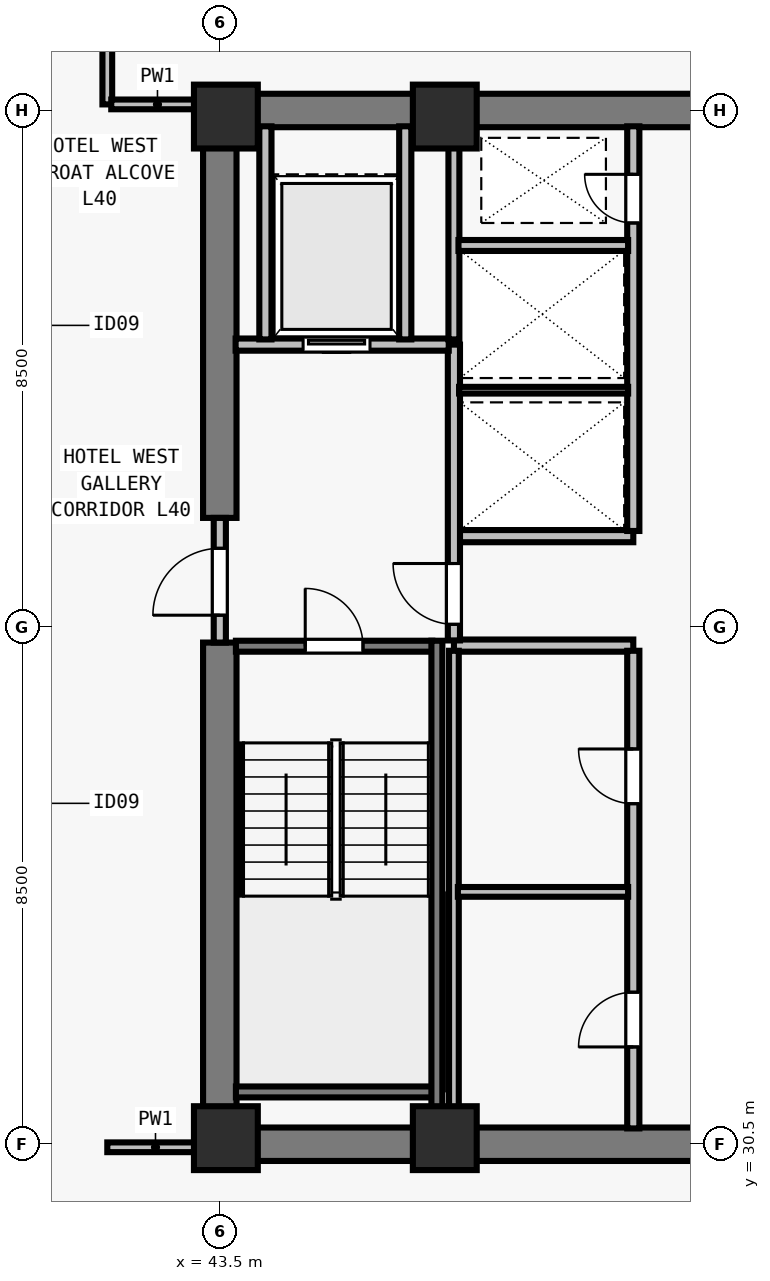
"""IFC4 building model, lengths in metres.
Left out: names, types, materials, properties, quantities, classifications, styles, units other than length and angle.
Written with IfcOpenShell. Run it as: python <this file> out.ifc"""

import sys

from ifc_helpers import new_model, si_unit, direction, frame, frame_2d, origin, origin_2d, place, context, subcontext, project, spatial, rectangle, extrude, element, fill, save


model = new_model("IFC4")
c1 = context("Model", 3, precision=1e-05, world=origin(), true_north=direction((0.0, 1.0)))
c2 = subcontext(c1, "Body", "Model", "MODEL_VIEW")
j1 = project(units=[si_unit("LENGTHUNIT", "METRE"), si_unit("PLANEANGLEUNIT", "RADIAN")], contexts=[c1])
p1 = place(None, origin())
s1 = spatial("IfcSite", under=j1, at=p1, CompositionType="ELEMENT")
p2 = place(p1, origin())
s2 = spatial("IfcBuilding", under=s1, at=p2, CompositionType="ELEMENT")
p3 = place(p2, frame((0.0, 0.0, 148.0)))
s3 = spatial("IfcBuildingStorey", under=s2, at=p3, CompositionType="ELEMENT", Elevation=148.0)
for number, where, z_axis, x_axis in (
    (1, (43.6, 30.6, 0.0), (0.0, 0.0, 1.0), (1.0, 0.0, 0.0)),
    (2, (47.2, 30.6, 0.0), (0.0, 0.0, 1.0), (1.0, 0.0, 0.0)),
    (3, (43.6, 47.4, 0.0), (0.0, 0.0, 1.0), (1.0, 0.0, 0.0)),
    (4, (47.2, 47.4, 0.0), (0.0, 0.0, 1.0), (1.0, 0.0, 0.0)),
):
    element("IfcColumn", number, at=place(p3, frame(where, z_axis=z_axis, x_axis=x_axis)), inside=s3, PredefinedType="COLUMN", context=c2, shape_type="SweptSolid", body=[
        extrude(rectangle(XDim=1.05, YDim=1.05, at=origin_2d()), origin(), (0.0, 0.0, 1.0), 3.5),
    ])
for number, where, z_axis, x_axis in (
    (5, (43.225, 30.5, 0.0), (0.0, 0.0, 1.0), (1.0, 0.0, 0.0)),
    (6, (43.225, 47.5, 0.0), (0.0, 0.0, 1.0), (1.0, 0.0, 0.0)),
):
    element("IfcWall", number, at=place(p3, frame(where, z_axis=z_axis, x_axis=x_axis)), inside=s3, PredefinedType="SHEAR", context=c2, shape_type="SweptSolid", body=[
        extrude(rectangle(XDim=17.55, YDim=0.55, at=frame_2d((8.775, 0.0))), origin(), (0.0, 0.0, 1.0), 3.28),
    ])
p4 = place(p3, frame((43.5, 30.765, 0.0), z_axis=(0.0, 0.0, 1.0), x_axis=(0.0, 1.0, 0.0)))
e7 = element("IfcWall", 7, at=p4, inside=s3, PredefinedType="SHEAR", context=c2, shape_type="SweptSolid", body=[
    extrude(rectangle(XDim=7.985, YDim=0.55, at=frame_2d((3.993, 0.0))), origin(), (0.0, 0.0, 1.0), 3.28),
])
p5 = place(p3, frame((43.5, 40.8, 0.0), z_axis=(0.0, 0.0, 1.0), x_axis=(0.0, 1.0, 0.0)))
e8 = element("IfcWall", 8, at=p5, inside=s3, PredefinedType="SHEAR", context=c2, shape_type="SweptSolid", body=[
    extrude(rectangle(XDim=6.435, YDim=0.55, at=frame_2d((3.218, 0.0))), origin(), (0.0, 0.0, 1.0), 3.28),
])
for number, where, z_axis, x_axis in (
    (9, (47.35, 38.7, 0.0), (0.0, 0.0, 1.0), (1.0, 0.0, 0.0)),
    (10, (47.35, 40.5, 0.0), (0.0, 0.0, 1.0), (1.0, 0.0, 0.0)),
):
    element("IfcWall", number, at=place(p3, frame(where, z_axis=z_axis, x_axis=x_axis)), inside=s3, PredefinedType="SOLIDWALL", context=c2, shape_type="SweptSolid", body=[
        extrude(rectangle(XDim=2.95, YDim=0.2, at=frame_2d((1.475, 0.0))), origin(), (0.0, 0.0, 1.0), 3.28),
    ])
p6 = place(p3, frame((50.3, 30.76, 0.0), z_axis=(0.0, 0.0, 1.0), x_axis=(0.0, 1.0, 0.0)))
e11 = element("IfcWall", 11, at=p6, inside=s3, PredefinedType="SOLIDWALL", context=c2, shape_type="SweptSolid", body=[
    extrude(rectangle(XDim=7.855, YDim=0.2, at=frame_2d((3.927, 0.0))), origin(), (0.0, 0.0, 1.0), 3.28),
])
p7 = place(p6, frame((1.34, 0.0, 0.0)))
e12 = element("IfcOpeningElement", 12, at=p7, cuts=e11, PredefinedType="OPENING", context=c2, shape_type="SweptSolid", body=[
    extrude(rectangle(XDim=0.9, YDim=2.12, at=frame_2d((0.45, 1.06))), frame((0.0, 0.11, 0.0), z_axis=(0.0, -1.0, 0.0), x_axis=(1.0, 0.0, 0.0)), (0.0, 0.0, 1.0), 0.22),
])
p8 = place(p6, frame((5.34, 0.0, 0.0)))
e13 = element("IfcOpeningElement", 13, at=p8, cuts=e11, PredefinedType="OPENING", context=c2, shape_type="SweptSolid", body=[
    extrude(rectangle(XDim=0.9, YDim=2.12, at=frame_2d((0.45, 1.06))), frame((0.0, 0.11, 0.0), z_axis=(0.0, -1.0, 0.0), x_axis=(1.0, 0.0, 0.0)), (0.0, 0.0, 1.0), 0.22),
])
p9 = place(p3, frame((50.3, 40.585, 0.0), z_axis=(0.0, 0.0, 1.0), x_axis=(0.0, 1.0, 0.0)))
e14 = element("IfcWall", 14, at=p9, inside=s3, PredefinedType="SOLIDWALL", context=c2, shape_type="SweptSolid", body=[
    extrude(rectangle(XDim=6.655, YDim=0.2, at=frame_2d((3.328, 0.0))), origin(), (0.0, 0.0, 1.0), 3.28),
])
p10 = place(p9, frame((5.065, 0.0, 0.0)))
e15 = element("IfcOpeningElement", 15, at=p10, cuts=e14, PredefinedType="OPENING", context=c2, shape_type="SweptSolid", body=[
    extrude(rectangle(XDim=0.8, YDim=2.08, at=frame_2d((0.4, 1.04))), frame((0.0, 0.11, 0.0), z_axis=(0.0, -1.0, 0.0), x_axis=(1.0, 0.0, 0.0)), (0.0, 0.0, 1.0), 0.22),
])
p11 = place(p3, frame((43.5, 38.75, 0.0), z_axis=(0.0, 0.0, 1.0), x_axis=(0.0, 1.0, 0.0)))
e16 = element("IfcWall", 16, at=p11, inside=s3, PredefinedType="SOLIDWALL", context=c2, shape_type="SweptSolid", body=[
    extrude(rectangle(XDim=2.05, YDim=0.2, at=frame_2d((1.025, 0.0))), origin(), (0.0, 0.0, 1.0), 3.28),
])
p12 = place(p11, frame((0.45, 0.0, 0.0)))
e17 = element("IfcOpeningElement", 17, at=p12, cuts=e16, PredefinedType="OPENING", context=c2, shape_type="SweptSolid", body=[
    extrude(rectangle(XDim=1.1, YDim=2.15, at=frame_2d((0.55, 1.075))), frame((0.0, 0.11, 0.0), z_axis=(0.0, -1.0, 0.0), x_axis=(1.0, 0.0, 0.0)), (0.0, 0.0, 1.0), 0.22),
])
p13 = place(p3, frame((47.35, 38.785, 0.0), z_axis=(0.0, 0.0, 1.0), x_axis=(0.0, 1.0, 0.0)))
e18 = element("IfcWall", 18, at=p13, inside=s3, PredefinedType="SOLIDWALL", context=c2, shape_type="SweptSolid", body=[
    extrude(rectangle(XDim=4.865, YDim=0.2, at=frame_2d((2.433, 0.0))), origin(), (0.0, 0.0, 1.0), 3.28),
])
p14 = place(p13, frame((0.265, 0.0, 0.0)))
e19 = element("IfcOpeningElement", 19, at=p14, cuts=e18, PredefinedType="OPENING", context=c2, shape_type="SweptSolid", body=[
    extrude(rectangle(XDim=1.0, YDim=2.15, at=frame_2d((0.5, 1.075))), frame((0.0, 0.11, 0.0), z_axis=(0.0, -1.0, 0.0), x_axis=(1.0, 0.0, 0.0)), (0.0, 0.0, 1.0), 0.22),
])
p15 = place(p3, frame((43.76, 43.65, 0.0), z_axis=(0.0, 0.0, 1.0), x_axis=(1.0, 0.0, 0.0)))
e20 = element("IfcWall", 20, at=p15, inside=s3, PredefinedType="SOLIDWALL", context=c2, shape_type="SweptSolid", body=[
    extrude(rectangle(XDim=3.505, YDim=0.2, at=frame_2d((1.752, 0.0))), origin(), (0.0, 0.0, 1.0), 3.28),
])
p16 = place(p15, frame((1.11, 0.0, 0.0)))
e21 = element("IfcOpeningElement", 21, at=p16, cuts=e20, PredefinedType="OPENING", context=c2, shape_type="SweptSolid", body=[
    extrude(rectangle(XDim=1.1, YDim=2.2, at=frame_2d((0.55, 1.1))), frame((0.0, 0.11, 0.0), z_axis=(0.0, -1.0, 0.0), x_axis=(1.0, 0.0, 0.0)), (0.0, 0.0, 1.0), 0.22),
])
for number, where, z_axis, x_axis in (
    (22, (46.55, 43.735, 0.0), (0.0, 0.0, 1.0), (0.0, 1.0, 0.0)),
    (23, (44.25, 43.735, 0.0), (0.0, 0.0, 1.0), (0.0, 1.0, 0.0)),
):
    element("IfcWall", number, at=place(p3, frame(where, z_axis=z_axis, x_axis=x_axis)), inside=s3, PredefinedType="SOLIDWALL", context=c2, shape_type="SweptSolid", body=[
        extrude(rectangle(XDim=3.505, YDim=0.2, at=frame_2d((1.752, 0.0))), origin(), (0.0, 0.0, 1.0), 3.28),
    ])
p17 = place(p3, frame((47.35, 30.76, 0.0), z_axis=(0.0, 0.0, 1.0), x_axis=(0.0, 1.0, 0.0)))
e24 = element("IfcWall", 24, at=p17, inside=s3, PredefinedType="PARTITIONING", context=c2, shape_type="SweptSolid", body=[
    extrude(rectangle(XDim=7.855, YDim=0.16, at=frame_2d((3.927, 0.0))), origin(), (0.0, 0.0, 1.0), 3.28),
])
p18 = place(p3, frame((47.415, 34.65, 0.0), z_axis=(0.0, 0.0, 1.0), x_axis=(1.0, 0.0, 0.0)))
e25 = element("IfcWall", 25, at=p18, inside=s3, PredefinedType="PARTITIONING", context=c2, shape_type="SweptSolid", body=[
    extrude(rectangle(XDim=2.8, YDim=0.16, at=frame_2d((1.4, 0.0))), origin(), (0.0, 0.0, 1.0), 3.28),
])
p19 = place(p3, frame((47.35, 43.735, 0.0), z_axis=(0.0, 0.0, 1.0), x_axis=(0.0, 1.0, 0.0)))
e26 = element("IfcWall", 26, at=p19, inside=s3, PredefinedType="SOLIDWALL", context=c2, shape_type="SweptSolid", body=[
    extrude(rectangle(XDim=3.505, YDim=0.18, at=frame_2d((1.752, 0.0))), origin(), (0.0, 0.0, 1.0), 3.28),
])
p20 = place(p3, frame((47.435, 42.9, 0.0), z_axis=(0.0, 0.0, 1.0), x_axis=(1.0, 0.0, 0.0)))
e27 = element("IfcWall", 27, at=p20, inside=s3, PredefinedType="PARTITIONING", context=c2, shape_type="SweptSolid", body=[
    extrude(rectangle(XDim=2.78, YDim=0.11, at=frame_2d((1.39, 0.0))), origin(), (0.0, 0.0, 1.0), 3.28),
])
p21 = place(p3, frame((47.425, 45.28, 0.0), z_axis=(0.0, 0.0, 1.0), x_axis=(1.0, 0.0, 0.0)))
e28 = element("IfcWall", 28, at=p21, inside=s3, PredefinedType="SOLIDWALL", context=c2, shape_type="SweptSolid", body=[
    extrude(rectangle(XDim=2.79, YDim=0.18, at=frame_2d((1.395, 0.0))), origin(), (0.0, 0.0, 1.0), 3.28),
])
p22 = place(p3, frame((41.65, 47.6, 0.0), z_axis=(0.0, 0.0, 1.0), x_axis=(0.0, 1.0, 0.0)))
e29 = element("IfcWall", 29, at=p22, inside=s3, PredefinedType="PARTITIONING", context=c2, shape_type="SweptSolid", body=[
    extrude(rectangle(XDim=15.075, YDim=0.16, at=frame_2d((7.538, 0.0))), origin(), (0.0, 0.0, 1.0), 2.555),
])
p23 = place(p22, frame((1.8, 0.0, 0.0)))
e30 = element("IfcOpeningElement", 30, at=p23, cuts=e29, PredefinedType="OPENING", context=c2, shape_type="SweptSolid", body=[
    extrude(rectangle(XDim=0.96, YDim=2.12, at=frame_2d((0.48, 1.06))), frame((0.0, 0.09, 0.0), z_axis=(0.0, -1.0, 0.0), x_axis=(1.0, 0.0, 0.0)), (0.0, 0.0, 1.0), 0.18),
])
p24 = place(p3, frame((41.65, 30.45, 0.0), z_axis=(0.0, 0.0, 1.0), x_axis=(1.0, 0.0, 0.0)))
e31 = element("IfcWall", 31, at=p24, inside=s3, PredefinedType="PARTITIONING", context=c2, shape_type="SweptSolid", body=[
    extrude(rectangle(XDim=1.585, YDim=0.16, at=frame_2d((0.792, 0.0))), origin(), (0.0, 0.0, 1.0), 3.28),
])
p25 = place(p3, frame((41.715, 47.6, 0.0), z_axis=(0.0, 0.0, 1.0), x_axis=(1.0, 0.0, 0.0)))
e32 = element("IfcWall", 32, at=p25, inside=s3, PredefinedType="PARTITIONING", context=c2, shape_type="SweptSolid", body=[
    extrude(rectangle(XDim=1.52, YDim=0.16, at=frame_2d((0.76, 0.0))), origin(), (0.0, 0.0, 1.0), 3.28),
])
p26 = place(p3, frame((43.765, 38.69, 0.0), z_axis=(0.0, 0.0, 1.0), x_axis=(1.0, 0.0, 0.0)))
e33 = element("IfcWall", 33, at=p26, inside=s3, PredefinedType="SOLIDWALL", context=c2, shape_type="SweptSolid", body=[
    extrude(rectangle(XDim=3.23, YDim=0.18, at=frame_2d((1.615, 0.0))), origin(), (0.0, 0.0, 1.0), 3.28),
])
p27 = place(p26, frame((1.14, 0.0, 0.0)))
e34 = element("IfcOpeningElement", 34, at=p27, cuts=e33, PredefinedType="OPENING", context=c2, shape_type="SweptSolid", body=[
    extrude(rectangle(XDim=0.95, YDim=2.15, at=frame_2d((0.475, 1.075))), frame((0.0, 0.1, 0.0), z_axis=(0.0, -1.0, 0.0), x_axis=(1.0, 0.0, 0.0)), (0.0, 0.0, 1.0), 0.2),
])
p28 = place(p3, frame((43.765, 31.36, 0.0), z_axis=(0.0, 0.0, 1.0), x_axis=(1.0, 0.0, 0.0)))
e35 = element("IfcWall", 35, at=p28, inside=s3, PredefinedType="SOLIDWALL", context=c2, shape_type="SweptSolid", body=[
    extrude(rectangle(XDim=3.23, YDim=0.18, at=frame_2d((1.615, 0.0))), origin(), (0.0, 0.0, 1.0), 3.28),
])
p29 = place(p3, frame((47.07, 38.78, 0.0), z_axis=(0.0, 0.0, 1.0), x_axis=(0.0, -1.0, 0.0)))
e36 = element("IfcWall", 36, at=p29, inside=s3, PredefinedType="SOLIDWALL", context=c2, shape_type="SweptSolid", body=[
    extrude(rectangle(XDim=8.017, YDim=0.18, at=frame_2d((4.009, 0.0))), origin(), (0.0, 0.0, 1.0), 3.28),
])
p30 = place(p12, origin())
e37 = element("IfcDoor", 37, at=p30, inside=s3, OperationType="SINGLE_SWING_LEFT", PredefinedType="DOOR", context=c2, shape_type="SweptSolid", body=[
    extrude(rectangle(XDim=1.1, YDim=2.15, at=frame_2d((0.55, 1.075))), frame((0.0, 0.025, 0.0), z_axis=(0.0, -1.0, 0.0), x_axis=(1.0, 0.0, 0.0)), (0.0, 0.0, 1.0), 0.05),
])
fill(e17, e37)
p31 = place(p14, origin())
e38 = element("IfcDoor", 38, at=p31, inside=s3, OperationType="SINGLE_SWING_RIGHT", PredefinedType="DOOR", context=c2, shape_type="SweptSolid", body=[
    extrude(rectangle(XDim=1.0, YDim=2.15, at=frame_2d((0.5, 1.075))), frame((0.0, 0.025, 0.0), z_axis=(0.0, -1.0, 0.0), x_axis=(1.0, 0.0, 0.0)), (0.0, 0.0, 1.0), 0.05),
])
fill(e19, e38)
p32 = place(p16, origin())
e39 = element("IfcDoor", 39, at=p32, inside=s3, OperationType="SLIDING_TO_LEFT", PredefinedType="DOOR", context=c2, shape_type="SweptSolid", body=[
    extrude(rectangle(XDim=1.1, YDim=2.2, at=frame_2d((0.55, 1.1))), frame((0.0, 0.025, 0.0), z_axis=(0.0, -1.0, 0.0), x_axis=(1.0, 0.0, 0.0)), (0.0, 0.0, 1.0), 0.05),
])
fill(e21, e39)
p33 = place(p7, origin())
e40 = element("IfcDoor", 40, at=p33, inside=s3, OperationType="SINGLE_SWING_LEFT", PredefinedType="DOOR", context=c2, shape_type="SweptSolid", body=[
    extrude(rectangle(XDim=0.9, YDim=2.12, at=frame_2d((0.45, 1.06))), frame((0.0, 0.025, 0.0), z_axis=(0.0, -1.0, 0.0), x_axis=(1.0, 0.0, 0.0)), (0.0, 0.0, 1.0), 0.05),
])
fill(e12, e40)
p34 = place(p8, origin())
e41 = element("IfcDoor", 41, at=p34, inside=s3, OperationType="SINGLE_SWING_RIGHT", PredefinedType="DOOR", context=c2, shape_type="SweptSolid", body=[
    extrude(rectangle(XDim=0.9, YDim=2.12, at=frame_2d((0.45, 1.06))), frame((0.0, 0.025, 0.0), z_axis=(0.0, -1.0, 0.0), x_axis=(1.0, 0.0, 0.0)), (0.0, 0.0, 1.0), 0.05),
])
fill(e13, e41)
p35 = place(p10, origin())
e42 = element("IfcDoor", 42, at=p35, inside=s3, OperationType="SINGLE_SWING_RIGHT", PredefinedType="DOOR", context=c2, shape_type="SweptSolid", body=[
    extrude(rectangle(XDim=0.8, YDim=2.08, at=frame_2d((0.4, 1.04))), frame((0.0, 0.025, 0.0), z_axis=(0.0, -1.0, 0.0), x_axis=(1.0, 0.0, 0.0)), (0.0, 0.0, 1.0), 0.05),
])
fill(e15, e42)
p36 = place(p27, origin())
e43 = element("IfcDoor", 43, at=p36, inside=s3, OperationType="SINGLE_SWING_LEFT", PredefinedType="DOOR", context=c2, shape_type="SweptSolid", body=[
    extrude(rectangle(XDim=0.95, YDim=2.15, at=frame_2d((0.475, 1.075))), frame((0.0, 0.025, 0.0), z_axis=(0.0, -1.0, 0.0), x_axis=(1.0, 0.0, 0.0)), (0.0, 0.0, 1.0), 0.05),
])
fill(e34, e43)
save(model, sys.argv[1])
